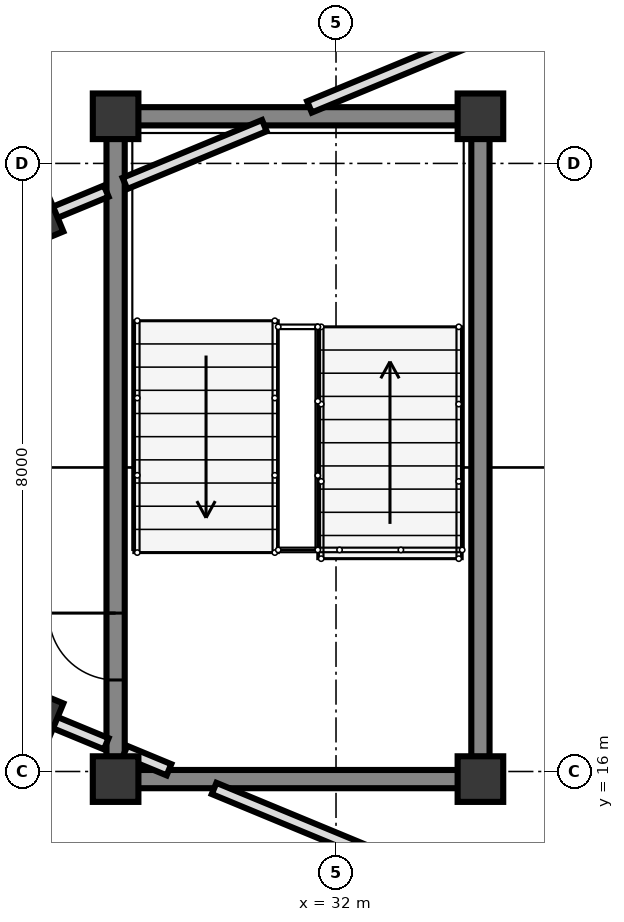
"""IFC4 building model, lengths in metres.
Left out: names, types, materials, properties, quantities, classifications, styles, units other than length and angle.
Written with IfcOpenShell. Run it as: python <this file> out.ifc"""

import sys

from ifc_helpers import new_model, si_unit, direction, frame, frame_2d, origin, origin_2d, place, context, subcontext, project, spatial, rectangle, extrude, element, fill, save


model = new_model("IFC4")
c1 = context("Model", 3, precision=1e-05, world=origin(), true_north=direction((0.0, 1.0)))
c2 = subcontext(c1, "Body", "Model", "MODEL_VIEW")
j1 = project(units=[si_unit("LENGTHUNIT", "METRE"), si_unit("PLANEANGLEUNIT", "RADIAN")], contexts=[c1])
p1 = place(None, origin())
s1 = spatial("IfcSite", under=j1, at=p1, CompositionType="ELEMENT")
p2 = place(p1, origin())
s2 = spatial("IfcBuilding", under=s1, at=p2, CompositionType="ELEMENT")
p3 = place(p2, frame((0.0, 0.0, 4.5)))
s3 = spatial("IfcBuildingStorey", under=s2, at=p3, CompositionType="ELEMENT", Elevation=4.5)
for number, where, z_axis, x_axis in (
    (1, (29.1, 15.9, 0.0), (0.0, 0.0, 1.0), (1.0, 0.0, 0.0)),
    (2, (33.9, 15.9, 0.0), (0.0, 0.0, 1.0), (1.0, 0.0, 0.0)),
    (3, (33.9, 24.62, 0.0), (0.0, 0.0, 1.0), (1.0, 0.0, 0.0)),
    (4, (29.1, 24.62, 0.0), (0.0, 0.0, 1.0), (1.0, 0.0, 0.0)),
):
    element("IfcColumn", number, at=place(p3, frame(where, z_axis=z_axis, x_axis=x_axis)), inside=s3, PredefinedType="COLUMN", context=c2, shape_type="SweptSolid", body=[
        extrude(rectangle(XDim=0.6, YDim=0.6, at=origin_2d()), origin(), (0.0, 0.0, 1.0), 4.0),
    ])
for number, where, z_axis, x_axis in (
    (5, (28.053, 23.253, 0.0), (0.0, 0.0, 1.0), (0.924, 0.383, 0.0)),
    (6, (28.053, 16.747, 0.0), (0.0, 0.0, 1.0), (0.924, -0.383, 0.0)),
):
    element("IfcColumn", number, at=place(p3, frame(where, z_axis=z_axis, x_axis=x_axis)), inside=s3, PredefinedType="COLUMN", context=c2, shape_type="SweptSolid", body=[
        extrude(rectangle(XDim=0.55, YDim=0.55, at=origin_2d()), origin(), (0.0, 0.0, 1.0), 4.0),
    ])
p4 = place(p3, frame((29.1, 16.192, 0.0), z_axis=(0.0, 0.0, 1.0), x_axis=(0.0, 1.0, 0.0)))
e7 = element("IfcWall", 7, at=p4, inside=s3, PredefinedType="SHEAR", context=c2, shape_type="SweptSolid", body=[
    extrude(rectangle(XDim=8.136, YDim=0.24, at=frame_2d((4.068, 0.0))), origin(), (0.0, 0.0, 1.0), 3.74),
])
p5 = place(p4, frame((1.012, 0.0, 0.0)))
e8 = element("IfcOpeningElement", 8, at=p5, cuts=e7, PredefinedType="OPENING", context=c2, shape_type="SweptSolid", body=[
    extrude(rectangle(XDim=0.88, YDim=2.1, at=frame_2d((0.44, 1.05))), frame((0.0, 0.13, 0.0), z_axis=(0.0, -1.0, 0.0), x_axis=(1.0, 0.0, 0.0)), (0.0, 0.0, 1.0), 0.26),
])
p6 = place(p3, frame((33.9, 24.328, 0.0), z_axis=(0.0, 0.0, 1.0), x_axis=(0.0, -1.0, 0.0)))
e9 = element("IfcWall", 9, at=p6, inside=s3, PredefinedType="SHEAR", context=c2, shape_type="SweptSolid", body=[
    extrude(rectangle(XDim=8.136, YDim=0.24, at=frame_2d((4.068, 0.0))), origin(), (0.0, 0.0, 1.0), 3.74),
])
for number, where, z_axis, x_axis in (
    (10, (33.608, 15.9, 0.0), (0.0, 0.0, 1.0), (-1.0, 0.0, 0.0)),
    (11, (33.608, 24.62, 0.0), (0.0, 0.0, 1.0), (-1.0, 0.0, 0.0)),
):
    element("IfcWall", number, at=place(p3, frame(where, z_axis=z_axis, x_axis=x_axis)), inside=s3, PredefinedType="SHEAR", context=c2, shape_type="SweptSolid", body=[
        extrude(rectangle(XDim=4.216, YDim=0.24, at=frame_2d((2.108, 0.0))), origin(), (0.0, 0.0, 1.0), 3.74),
    ])
p7 = place(p3, frame((28.3, 23.355, 0.0), z_axis=(0.0, 0.0, 1.0), x_axis=(0.924069600435, 0.382224245113, 0.0)))
e12 = element("IfcWall", 12, at=p7, inside=s3, PredefinedType="PARTITIONING", context=c2, shape_type="SweptSolid", body=[
    extrude(rectangle(XDim=0.733, YDim=0.16, at=frame_2d((0.366, 0.0))), origin(), (0.0, 0.0, 1.0), 3.7),
])
p8 = place(p3, frame((29.223, 23.737, 0.0), z_axis=(0.0, 0.0, 1.0), x_axis=(0.923817443679, 0.382833293686, 0.0)))
e13 = element("IfcWall", 13, at=p8, inside=s3, PredefinedType="PARTITIONING", context=c2, shape_type="SweptSolid", body=[
    extrude(rectangle(XDim=1.985, YDim=0.16, at=frame_2d((0.993, 0.0))), origin(), (0.0, 0.0, 1.0), 3.7),
])
p9 = place(p3, frame((31.651, 24.743, 0.0), z_axis=(0.0, 0.0, 1.0), x_axis=(0.923877739946, 0.382687759972, 0.0)))
e14 = element("IfcWall", 14, at=p9, inside=s3, PredefinedType="PARTITIONING", context=c2, shape_type="SweptSolid", body=[
    extrude(rectangle(XDim=4.813, YDim=0.16, at=frame_2d((2.407, 0.0))), origin(), (0.0, 0.0, 1.0), 3.7),
])
p10 = place(p3, frame((28.3, 16.645, 0.0), z_axis=(0.0, 0.0, 1.0), x_axis=(0.924069600435, -0.382224245113, 0.0)))
e15 = element("IfcWall", 15, at=p10, inside=s3, PredefinedType="PARTITIONING", context=c2, shape_type="SweptSolid", body=[
    extrude(rectangle(XDim=0.733, YDim=0.16, at=frame_2d((0.366, 0.0))), origin(), (0.0, 0.0, 1.0), 3.072),
])
p11 = place(p3, frame((29.223, 16.263, 0.0), z_axis=(0.0, 0.0, 1.0), x_axis=(0.923812676193, -0.382844797933, 0.0)))
e16 = element("IfcWall", 16, at=p11, inside=s3, PredefinedType="PARTITIONING", context=c2, shape_type="SweptSolid", body=[
    extrude(rectangle(XDim=0.627, YDim=0.16, at=frame_2d((0.313, 0.0))), origin(), (0.0, 0.0, 1.0), 3.072),
])
p12 = place(p3, frame((30.396, 15.777, 0.0), z_axis=(0.0, 0.0, 1.0), x_axis=(0.923864955254, -0.382718623082, 0.0)))
e17 = element("IfcWall", 17, at=p12, inside=s3, PredefinedType="PARTITIONING", context=c2, shape_type="SweptSolid", body=[
    extrude(rectangle(XDim=6.172, YDim=0.16, at=frame_2d((3.086, 0.0))), origin(), (0.0, 0.0, 1.0), 3.072),
])
p13 = place(p5, origin())
e18 = element("IfcDoor", 18, at=p13, inside=s3, OperationType="SINGLE_SWING_RIGHT", PredefinedType="DOOR", context=c2, shape_type="SweptSolid", body=[
    extrude(rectangle(XDim=0.88, YDim=2.1, at=frame_2d((0.44, 1.05))), frame((0.0, 0.025, 0.0), z_axis=(0.0, -1.0, 0.0), x_axis=(1.0, 0.0, 0.0)), (0.0, 0.0, 1.0), 0.05),
])
fill(e8, e18)
save(model, sys.argv[1])
